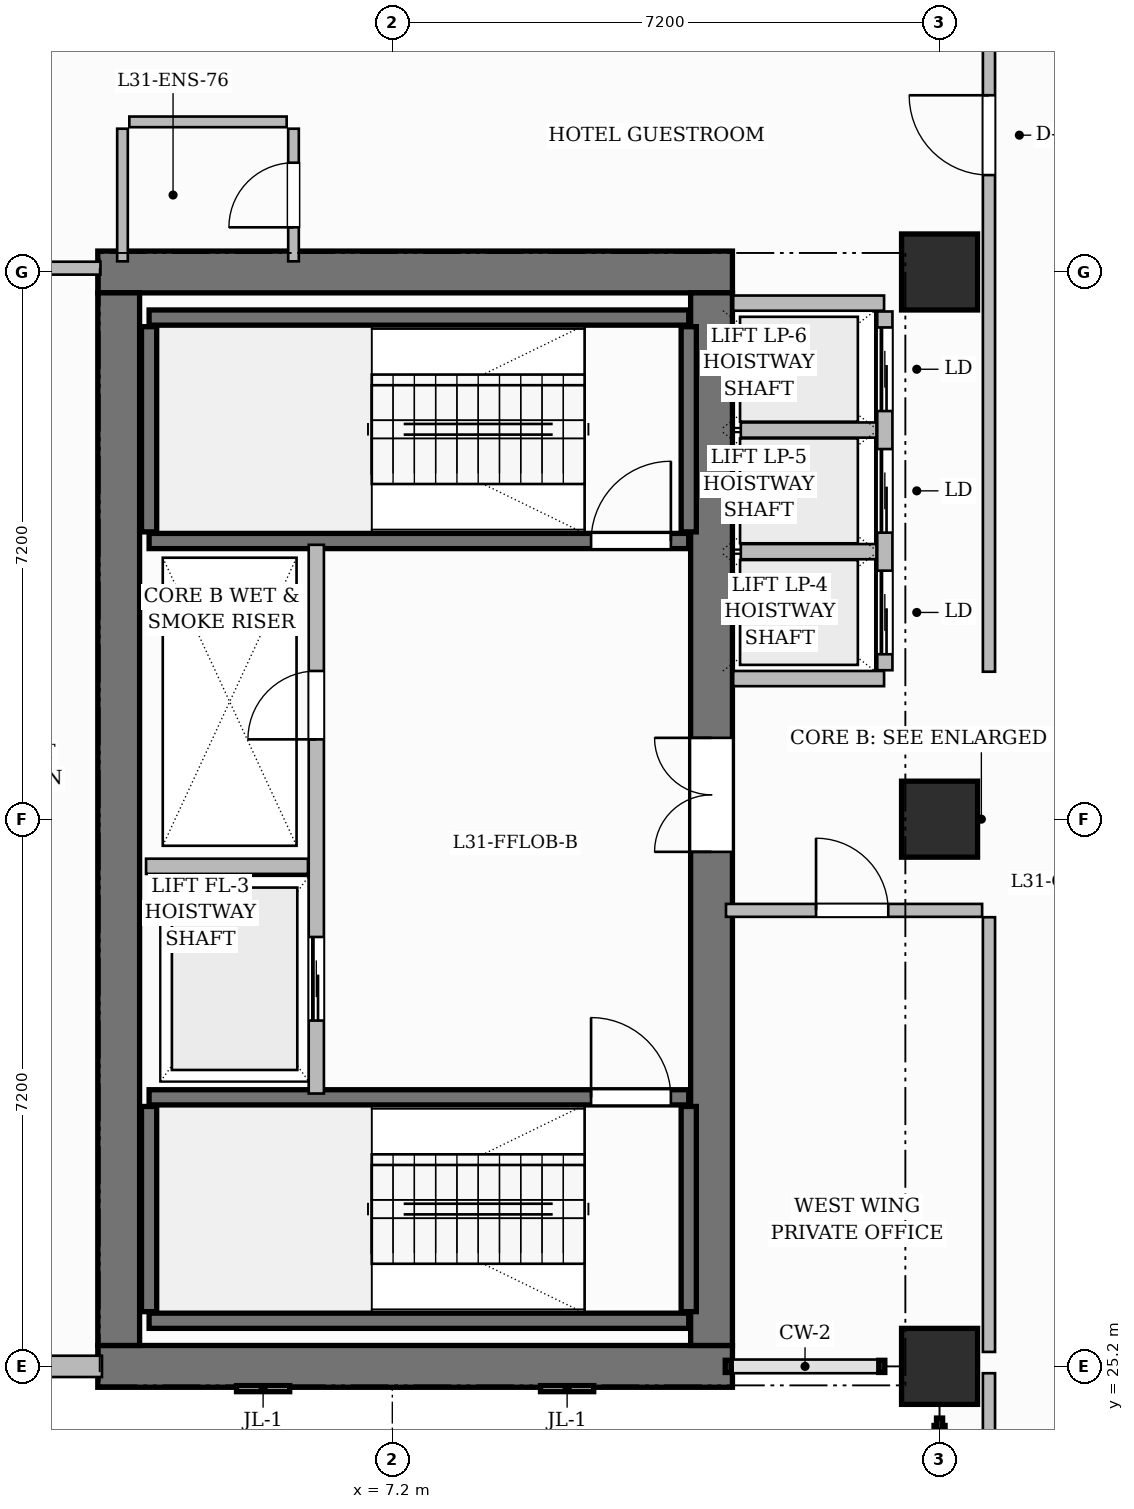
"""IFC4 building model, lengths in metres.
Left out: names, types, materials, properties, quantities, classifications, styles, units other than length and angle.
Written with IfcOpenShell. Run it as: python <this file> out.ifc"""

import sys

from ifc_helpers import new_model, si_unit, direction, frame, frame_2d, origin, origin_2d, place, context, subcontext, project, spatial, rectangle, extrude, source, transform, mapped, element, fill, save


model = new_model("IFC4")
c1 = context("Model", 3, precision=1e-05, world=origin(), true_north=direction((0.0, 1.0)))
c2 = subcontext(c1, "Body", "Model", "MODEL_VIEW")
j1 = project(units=[si_unit("LENGTHUNIT", "METRE"), si_unit("PLANEANGLEUNIT", "RADIAN")], contexts=[c1])
p1 = place(None, origin())
s1 = spatial("IfcSite", under=j1, at=p1, CompositionType="ELEMENT")
p2 = place(p1, origin())
s2 = spatial("IfcBuilding", under=s1, at=p2, CompositionType="ELEMENT")
p3 = place(p2, frame((0.0, 0.0, 126.6)))
s3 = spatial("IfcBuildingStorey", under=s2, at=p3, CompositionType="ELEMENT", Elevation=126.6)
for number, where, z_axis, x_axis in (
    (1, (3.325, 25.2, 0.0), (0.0, 0.0, 1.0), (1.0, 0.0, 0.0)),
    (2, (3.325, 39.6, 0.0), (0.0, 0.0, 1.0), (1.0, 0.0, 0.0)),
):
    element("IfcWall", number, at=place(p3, frame(where, z_axis=z_axis, x_axis=x_axis)), inside=s3, PredefinedType="SHEAR", context=c2, shape_type="SweptSolid", body=[
        extrude(rectangle(XDim=8.35, YDim=0.55, at=frame_2d((4.175, 0.0))), origin(), (0.0, 0.0, 1.0), 3.7),
    ])
p4 = place(p3, frame((3.6, 25.475, 0.0), z_axis=(0.0, 0.0, 1.0), x_axis=(0.0, 1.0, 0.0)))
e3 = element("IfcWall", 3, at=p4, inside=s3, PredefinedType="SHEAR", context=c2, shape_type="SweptSolid", body=[
    extrude(rectangle(XDim=13.85, YDim=0.55, at=frame_2d((6.925, 0.0))), origin(), (0.0, 0.0, 1.0), 3.7),
])
p5 = place(p3, frame((11.4, 25.475, 0.0), z_axis=(0.0, 0.0, 1.0), x_axis=(0.0, 1.0, 0.0)))
e4 = element("IfcWall", 4, at=p5, inside=s3, PredefinedType="SHEAR", context=c2, shape_type="SweptSolid", body=[
    extrude(rectangle(XDim=13.85, YDim=0.55, at=frame_2d((6.925, 0.0))), origin(), (0.0, 0.0, 1.0), 3.7),
])
p6 = place(p5, frame((6.495, 0.0, 0.0)))
e5 = element("IfcOpeningElement", 5, at=p6, cuts=e4, PredefinedType="OPENING", context=c2, shape_type="SweptSolid", body=[
    extrude(rectangle(XDim=1.5, YDim=2.2, at=frame_2d((0.75, 1.1))), frame((0.0, 0.285, 0.0), z_axis=(0.0, -1.0, 0.0), x_axis=(1.0, 0.0, 0.0)), (0.0, 0.0, 1.0), 0.57),
])
m1 = source(origin(), c2, "Body", "SweptSolid", [
    extrude(rectangle(XDim=1.0, YDim=1.0, at=origin_2d()), origin(), (0.0, 0.0, 1.0), 3.7),
])
for number, where, z_axis, x_axis in (
    (6, (14.4, 25.2, 0.0), (0.0, 0.0, 1.0), (1.0, 0.0, 0.0)),
    (7, (14.4, 32.4, 0.0), (0.0, 0.0, 1.0), (1.0, 0.0, 0.0)),
    (8, (14.4, 39.6, 0.0), (0.0, 0.0, 1.0), (1.0, 0.0, 0.0)),
):
    element("IfcColumn", number, at=place(p3, frame(where, z_axis=z_axis, x_axis=x_axis)), inside=s3, PredefinedType="COLUMN", context=c2, shape_type="MappedRepresentation", body=[
        mapped(m1, transform((0.0, 0.0, 0.0), scale=1.0)),
    ])
p7 = place(p3, frame((4.0, 25.8, 0.0), z_axis=(0.0, 0.0, 1.0), x_axis=(1.0, 0.0, 0.0)))
e9 = element("IfcWall", 9, at=p7, inside=s3, PredefinedType="SHEAR", context=c2, shape_type="SweptSolid", body=[
    extrude(rectangle(XDim=7.1, YDim=0.2, at=frame_2d((3.55, 0.0))), origin(), (0.0, 0.0, 1.0), 3.7),
])
for number, where, z_axis, x_axis in (
    (10, (4.0, 25.92, 0.0), (0.0, 0.0, 1.0), (0.0, 1.0, 0.0)),
    (11, (11.1, 25.92, 0.0), (0.0, 0.0, 1.0), (0.0, 1.0, 0.0)),
):
    element("IfcWall", number, at=place(p3, frame(where, z_axis=z_axis, x_axis=x_axis)), inside=s3, PredefinedType="SHEAR", context=c2, shape_type="SweptSolid", body=[
        extrude(rectangle(XDim=2.7, YDim=0.2, at=frame_2d((1.35, 0.0))), origin(), (0.0, 0.0, 1.0), 3.7),
    ])
p8 = place(p3, frame((4.0, 28.74, 0.0), z_axis=(0.0, 0.0, 1.0), x_axis=(1.0, 0.0, 0.0)))
e12 = element("IfcWall", 12, at=p8, inside=s3, PredefinedType="SHEAR", context=c2, shape_type="SweptSolid", body=[
    extrude(rectangle(XDim=7.1, YDim=0.2, at=frame_2d((3.55, 0.0))), origin(), (0.0, 0.0, 1.0), 3.7),
])
p9 = place(p8, frame((5.815, 0.0, 0.0)))
e13 = element("IfcOpeningElement", 13, at=p9, cuts=e12, PredefinedType="OPENING", context=c2, shape_type="SweptSolid", body=[
    extrude(rectangle(XDim=1.05, YDim=2.2, at=frame_2d((0.525, 1.1))), frame((0.0, 0.11, 0.0), z_axis=(0.0, -1.0, 0.0), x_axis=(1.0, 0.0, 0.0)), (0.0, 0.0, 1.0), 0.22),
])
p10 = place(p3, frame((4.0, 39.0, 0.0), z_axis=(0.0, 0.0, 1.0), x_axis=(1.0, 0.0, 0.0)))
e14 = element("IfcWall", 14, at=p10, inside=s3, PredefinedType="SHEAR", context=c2, shape_type="SweptSolid", body=[
    extrude(rectangle(XDim=7.1, YDim=0.2, at=frame_2d((3.55, 0.0))), origin(), (0.0, 0.0, 1.0), 3.7),
])
for number, where, z_axis, x_axis in (
    (15, (4.0, 36.18, 0.0), (0.0, 0.0, 1.0), (0.0, 1.0, 0.0)),
    (16, (11.1, 36.18, 0.0), (0.0, 0.0, 1.0), (0.0, 1.0, 0.0)),
):
    element("IfcWall", number, at=place(p3, frame(where, z_axis=z_axis, x_axis=x_axis)), inside=s3, PredefinedType="SHEAR", context=c2, shape_type="SweptSolid", body=[
        extrude(rectangle(XDim=2.7, YDim=0.2, at=frame_2d((1.35, 0.0))), origin(), (0.0, 0.0, 1.0), 3.7),
    ])
p11 = place(p3, frame((4.0, 36.06, 0.0), z_axis=(0.0, 0.0, 1.0), x_axis=(1.0, 0.0, 0.0)))
e17 = element("IfcWall", 17, at=p11, inside=s3, PredefinedType="SHEAR", context=c2, shape_type="SweptSolid", body=[
    extrude(rectangle(XDim=7.1, YDim=0.2, at=frame_2d((3.55, 0.0))), origin(), (0.0, 0.0, 1.0), 3.7),
])
p12 = place(p11, frame((5.815, 0.0, 0.0)))
e18 = element("IfcOpeningElement", 18, at=p12, cuts=e17, PredefinedType="OPENING", context=c2, shape_type="SweptSolid", body=[
    extrude(rectangle(XDim=1.05, YDim=2.2, at=frame_2d((0.525, 1.1))), frame((0.0, 0.11, 0.0), z_axis=(0.0, -1.0, 0.0), x_axis=(1.0, 0.0, 0.0)), (0.0, 0.0, 1.0), 0.22),
])
p13 = place(p3, frame((6.2, 28.79, 0.0), z_axis=(0.0, 0.0, 1.0), x_axis=(0.0, 1.0, 0.0)))
e19 = element("IfcWall", 19, at=p13, inside=s3, PredefinedType="PARTITIONING", context=c2, shape_type="SweptSolid", body=[
    extrude(rectangle(XDim=7.22, YDim=0.2, at=frame_2d((3.61, 0.0))), origin(), (0.0, 0.0, 1.0), 3.45),
])
p14 = place(p13, frame((4.66, 0.0, 0.0)))
e20 = element("IfcOpeningElement", 20, at=p14, cuts=e19, PredefinedType="OPENING", context=c2, shape_type="SweptSolid", body=[
    extrude(rectangle(XDim=0.9, YDim=2.1, at=frame_2d((0.45, 1.05))), frame((0.0, 0.11, 0.0), z_axis=(0.0, -1.0, 0.0), x_axis=(1.0, 0.0, 0.0)), (0.0, 0.0, 1.0), 0.22),
])
p15 = place(p13, frame((0.96, 0.0, 0.0)))
e21 = element("IfcOpeningElement", 21, at=p15, cuts=e19, PredefinedType="OPENING", context=c2, shape_type="SweptSolid", body=[
    extrude(rectangle(XDim=1.1, YDim=2.2, at=frame_2d((0.55, 1.1))), frame((0.0, 0.11, 0.0), z_axis=(0.0, -1.0, 0.0), x_axis=(1.0, 0.0, 0.0)), (0.0, 0.0, 1.0), 0.22),
])
p16 = place(p3, frame((3.96, 31.78, 0.0), z_axis=(0.0, 0.0, 1.0), x_axis=(1.0, 0.0, 0.0)))
e22 = element("IfcWall", 22, at=p16, inside=s3, PredefinedType="PARTITIONING", context=c2, shape_type="SweptSolid", body=[
    extrude(rectangle(XDim=2.13, YDim=0.2, at=frame_2d((1.065, 0.0))), origin(), (0.0, 0.0, 1.0), 3.45),
])
for number, where, z_axis, x_axis in (
    (23, (11.685, 34.25, 0.0), (0.0, 0.0, 1.0), (1.0, 0.0, 0.0)),
    (24, (11.685, 39.19, 0.0), (0.0, 0.0, 1.0), (1.0, 0.0, 0.0)),
):
    element("IfcWall", number, at=place(p3, frame(where, z_axis=z_axis, x_axis=x_axis)), inside=s3, PredefinedType="PARTITIONING", context=c2, shape_type="SweptSolid", body=[
        extrude(rectangle(XDim=1.985, YDim=0.2, at=frame_2d((0.992, 0.0))), origin(), (0.0, 0.0, 1.0), 3.45),
    ])
p17 = place(p3, frame((13.68, 34.36, 0.0), z_axis=(0.0, 0.0, 1.0), x_axis=(0.0, 1.0, 0.0)))
e25 = element("IfcWall", 25, at=p17, inside=s3, PredefinedType="PARTITIONING", context=c2, shape_type="SweptSolid", body=[
    extrude(rectangle(XDim=4.72, YDim=0.2, at=frame_2d((2.36, 0.0))), origin(), (0.0, 0.0, 1.0), 3.45),
])
p18 = place(p17, frame((0.21, 0.0, 0.0)))
e26 = element("IfcOpeningElement", 26, at=p18, cuts=e25, PredefinedType="OPENING", context=c2, shape_type="SweptSolid", body=[
    extrude(rectangle(XDim=1.1, YDim=2.2, at=frame_2d((0.55, 1.1))), frame((0.0, 0.11, 0.0), z_axis=(0.0, -1.0, 0.0), x_axis=(1.0, 0.0, 0.0)), (0.0, 0.0, 1.0), 0.22),
])
p19 = place(p17, frame((1.81, 0.0, 0.0)))
e27 = element("IfcOpeningElement", 27, at=p19, cuts=e25, PredefinedType="OPENING", context=c2, shape_type="SweptSolid", body=[
    extrude(rectangle(XDim=1.1, YDim=2.2, at=frame_2d((0.55, 1.1))), frame((0.0, 0.11, 0.0), z_axis=(0.0, -1.0, 0.0), x_axis=(1.0, 0.0, 0.0)), (0.0, 0.0, 1.0), 0.22),
])
p20 = place(p17, frame((3.41, 0.0, 0.0)))
e28 = element("IfcOpeningElement", 28, at=p20, cuts=e25, PredefinedType="OPENING", context=c2, shape_type="SweptSolid", body=[
    extrude(rectangle(XDim=1.1, YDim=2.2, at=frame_2d((0.55, 1.1))), frame((0.0, 0.11, 0.0), z_axis=(0.0, -1.0, 0.0), x_axis=(1.0, 0.0, 0.0)), (0.0, 0.0, 1.0), 0.22),
])
for number, where, z_axis, x_axis in (
    (29, (11.785, 35.92, 0.0), (0.0, 0.0, 1.0), (1.0, 0.0, 0.0)),
    (30, (11.785, 37.52, 0.0), (0.0, 0.0, 1.0), (1.0, 0.0, 0.0)),
):
    element("IfcWall", number, at=place(p3, frame(where, z_axis=z_axis, x_axis=x_axis)), inside=s3, PredefinedType="PARTITIONING", context=c2, shape_type="SweptSolid", body=[
        extrude(rectangle(XDim=1.785, YDim=0.2, at=frame_2d((0.893, 0.0))), origin(), (0.0, 0.0, 1.0), 3.45),
    ])
p21 = place(p3, frame((15.05, 12.36, 0.0), z_axis=(0.0, 0.0, 1.0), x_axis=(0.0, 1.0, 0.0)))
e31 = element("IfcWall", 31, at=p21, inside=s3, PredefinedType="PARTITIONING", context=c2, shape_type="SweptSolid", body=[
    extrude(rectangle(XDim=12.75, YDim=0.16, at=frame_2d((6.375, 0.0))), origin(), (0.0, 0.0, 1.0), 3.45),
])
p22 = place(p3, frame((0.24, 39.65, 0.0), z_axis=(0.0, 0.0, 1.0), x_axis=(1.0, 0.0, 0.0)))
e32 = element("IfcWall", 32, at=p22, inside=s3, PredefinedType="PARTITIONING", context=c2, shape_type="SweptSolid", body=[
    extrude(rectangle(XDim=3.12, YDim=0.17, at=frame_2d((1.56, 0.0))), origin(), (0.0, 0.0, 1.0), 3.45),
])
p23 = place(p22, frame((1.11, 0.0, 0.0)))
e33 = element("IfcOpeningElement", 33, at=p23, cuts=e32, PredefinedType="OPENING", context=c2, shape_type="SweptSolid", body=[
    extrude(rectangle(XDim=0.9, YDim=2.15, at=frame_2d((0.45, 1.075))), frame((0.0, 0.095, 0.0), z_axis=(0.0, -1.0, 0.0), x_axis=(1.0, 0.0, 0.0)), (0.0, 0.0, 1.0), 0.19),
])
p24 = place(p3, frame((15.05, 34.34, 0.0), z_axis=(0.0, 0.0, 1.0), x_axis=(0.0, 1.0, 0.0)))
e34 = element("IfcWall", 34, at=p24, inside=s3, PredefinedType="PARTITIONING", context=c2, shape_type="SweptSolid", body=[
    extrude(rectangle(XDim=12.312, YDim=0.16, at=frame_2d((6.156, 0.0))), origin(), (0.0, 0.0, 1.0), 3.45),
])
p25 = place(p24, frame((6.535, 0.0, 0.0)))
e35 = element("IfcOpeningElement", 35, at=p25, cuts=e34, PredefinedType="OPENING", context=c2, shape_type="SweptSolid", body=[
    extrude(rectangle(XDim=1.05, YDim=2.25, at=frame_2d((0.525, 1.125))), frame((0.0, 0.09, 0.0), z_axis=(0.0, -1.0, 0.0), x_axis=(1.0, 0.0, 0.0)), (0.0, 0.0, 1.0), 0.18),
])
p26 = place(p24, frame((10.06, 0.0, 0.0)))
e36 = element("IfcOpeningElement", 36, at=p26, cuts=e34, PredefinedType="OPENING", context=c2, shape_type="SweptSolid", body=[
    extrude(rectangle(XDim=1.0, YDim=2.2, at=frame_2d((0.5, 1.1))), frame((0.0, 0.09, 0.0), z_axis=(0.0, -1.0, 0.0), x_axis=(1.0, 0.0, 0.0)), (0.0, 0.0, 1.0), 0.18),
])
p27 = place(p3, frame((3.65, 39.74, 0.0), z_axis=(0.0, 0.0, 1.0), x_axis=(0.0, 1.0, 0.0)))
e37 = element("IfcWall", 37, at=p27, inside=s3, PredefinedType="PARTITIONING", context=c2, shape_type="SweptSolid", body=[
    extrude(rectangle(XDim=1.745, YDim=0.14, at=frame_2d((0.873, 0.0))), origin(), (0.0, 0.0, 1.0), 3.45),
])
p28 = place(p3, frame((3.74, 41.575, 0.0), z_axis=(0.0, 0.0, 1.0), x_axis=(1.0, 0.0, 0.0)))
e38 = element("IfcWall", 38, at=p28, inside=s3, PredefinedType="PARTITIONING", context=c2, shape_type="SweptSolid", body=[
    extrude(rectangle(XDim=2.07, YDim=0.14, at=frame_2d((1.035, 0.0))), origin(), (0.0, 0.0, 1.0), 2.935),
])
p29 = place(p3, frame((5.9, 39.74, 0.0), z_axis=(0.0, 0.0, 1.0), x_axis=(0.0, 1.0, 0.0)))
e39 = element("IfcWall", 39, at=p29, inside=s3, PredefinedType="PARTITIONING", context=c2, shape_type="SweptSolid", body=[
    extrude(rectangle(XDim=1.745, YDim=0.14, at=frame_2d((0.873, 0.0))), origin(), (0.0, 0.0, 1.0), 3.45),
])
p30 = place(p29, frame((0.448, 0.0, 0.0)))
e40 = element("IfcOpeningElement", 40, at=p30, cuts=e39, PredefinedType="OPENING", context=c2, shape_type="SweptSolid", body=[
    extrude(rectangle(XDim=0.85, YDim=2.1, at=frame_2d((0.425, 1.05))), frame((0.0, 0.08, 0.0), z_axis=(0.0, -1.0, 0.0), x_axis=(1.0, 0.0, 0.0)), (0.0, 0.0, 1.0), 0.16),
])
p31 = place(p3, frame((15.05, 25.39, 0.0), z_axis=(0.0, 0.0, 1.0), x_axis=(0.0, 1.0, 0.0)))
e41 = element("IfcWall", 41, at=p31, inside=s3, PredefinedType="PARTITIONING", context=c2, shape_type="SweptSolid", body=[
    extrude(rectangle(XDim=5.72, YDim=0.16, at=frame_2d((2.86, 0.0))), origin(), (0.0, 0.0, 1.0), 3.45),
])
p32 = place(p3, frame((11.59, 31.2, 0.0), z_axis=(0.0, 0.0, 1.0), x_axis=(1.0, 0.0, 0.0)))
e42 = element("IfcWall", 42, at=p32, inside=s3, PredefinedType="PARTITIONING", context=c2, shape_type="SweptSolid", body=[
    extrude(rectangle(XDim=3.37, YDim=0.17, at=frame_2d((1.685, 0.0))), origin(), (0.0, 0.0, 1.0), 3.45),
])
p33 = place(p32, frame((1.185, 0.0, 0.0)))
e43 = element("IfcOpeningElement", 43, at=p33, cuts=e42, PredefinedType="OPENING", context=c2, shape_type="SweptSolid", body=[
    extrude(rectangle(XDim=0.95, YDim=2.15, at=frame_2d((0.475, 1.075))), frame((0.0, 0.095, 0.0), z_axis=(0.0, -1.0, 0.0), x_axis=(1.0, 0.0, 0.0)), (0.0, 0.0, 1.0), 0.19),
])
p34 = place(p3, frame((0.0, 25.2, 0.0), z_axis=(0.0, 0.0, 1.0), x_axis=(1.0, 0.0, 0.0)))
e44 = element("IfcWall", 44, at=p34, inside=s3, PredefinedType="SOLIDWALL", context=c2, shape_type="SweptSolid", body=[
    extrude(rectangle(XDim=3.38, YDim=0.28, at=frame_2d((1.69, 0.0))), origin(), (0.0, 0.0, 1.0), 3.45),
])
p35 = place(p34, frame((1.205, 0.0, 0.8)))
e45 = element("IfcOpeningElement", 45, at=p35, cuts=e44, PredefinedType="OPENING", context=c2, shape_type="SweptSolid", body=[
    extrude(rectangle(XDim=1.4, YDim=1.85, at=frame_2d((0.7, 0.925))), frame((0.0, 0.15, 0.0), z_axis=(0.0, -1.0, 0.0), x_axis=(1.0, 0.0, 0.0)), (0.0, 0.0, 1.0), 0.3),
])
m2 = source(origin(), c2, "Body", "SweptSolid", [
    extrude(rectangle(XDim=1.05, YDim=2.2, at=frame_2d((0.525, 1.1))), frame((0.0, 0.025, 0.0), z_axis=(0.0, -1.0, 0.0), x_axis=(1.0, 0.0, 0.0)), (0.0, 0.0, 1.0), 0.05),
])
p36 = place(p9, origin())
e46 = element("IfcDoor", 46, at=p36, inside=s3, OperationType="SINGLE_SWING_LEFT", PredefinedType="DOOR", context=c2, shape_type="MappedRepresentation", body=[
    mapped(m2, transform((0.0, 0.0, 0.0), scale=1.0)),
])
fill(e13, e46)
p37 = place(p12, origin())
e47 = element("IfcDoor", 47, at=p37, inside=s3, OperationType="SINGLE_SWING_RIGHT", PredefinedType="DOOR", context=c2, shape_type="MappedRepresentation", body=[
    mapped(m2, transform((0.0, 0.0, 0.0), scale=1.0)),
])
fill(e18, e47)
m3 = source(origin(), c2, "Body", "SweptSolid", [
    extrude(rectangle(XDim=0.9, YDim=2.1, at=frame_2d((0.45, 1.05))), frame((0.0, 0.025, 0.0), z_axis=(0.0, -1.0, 0.0), x_axis=(1.0, 0.0, 0.0)), (0.0, 0.0, 1.0), 0.05),
])
p38 = place(p14, origin())
e48 = element("IfcDoor", 48, at=p38, inside=s3, OperationType="SINGLE_SWING_LEFT", PredefinedType="DOOR", context=c2, shape_type="MappedRepresentation", body=[
    mapped(m3, transform((0.0, 0.0, 0.0), scale=1.0)),
])
fill(e20, e48)
m4 = source(origin(), c2, "Body", "SweptSolid", [
    extrude(rectangle(XDim=1.5, YDim=2.2, at=frame_2d((0.75, 1.1))), frame((0.0, 0.025, 0.0), z_axis=(0.0, -1.0, 0.0), x_axis=(1.0, 0.0, 0.0)), (0.0, 0.0, 1.0), 0.05),
])
p39 = place(p6, origin())
e49 = element("IfcDoor", 49, at=p39, inside=s3, OperationType="DOUBLE_DOOR_SINGLE_SWING", PredefinedType="DOOR", context=c2, shape_type="MappedRepresentation", body=[
    mapped(m4, transform((0.0, 0.0, 0.0), scale=1.0)),
])
fill(e5, e49)
m5 = source(origin(), c2, "Body", "SweptSolid", [
    extrude(rectangle(XDim=0.85, YDim=2.1, at=frame_2d((0.425, 1.05))), frame((0.0, 0.025, 0.0), z_axis=(0.0, -1.0, 0.0), x_axis=(1.0, 0.0, 0.0)), (0.0, 0.0, 1.0), 0.05),
])
p40 = place(p30, origin())
e50 = element("IfcDoor", 50, at=p40, inside=s3, OperationType="SINGLE_SWING_LEFT", PredefinedType="DOOR", context=c2, shape_type="MappedRepresentation", body=[
    mapped(m5, transform((0.0, 0.0, 0.0), scale=1.0)),
])
fill(e40, e50)
m6 = source(origin(), c2, "Body", "SweptSolid", [
    extrude(rectangle(XDim=1.05, YDim=2.25, at=frame_2d((0.525, 1.125))), frame((0.0, 0.025, 0.0), z_axis=(0.0, -1.0, 0.0), x_axis=(1.0, 0.0, 0.0)), (0.0, 0.0, 1.0), 0.05),
])
p41 = place(p25, origin())
e51 = element("IfcDoor", 51, at=p41, inside=s3, OperationType="SINGLE_SWING_RIGHT", PredefinedType="DOOR", context=c2, shape_type="MappedRepresentation", body=[
    mapped(m6, transform((0.0, 0.0, 0.0), scale=1.0)),
])
fill(e35, e51)
m7 = source(origin(), c2, "Body", "SweptSolid", [
    extrude(rectangle(XDim=0.95, YDim=2.15, at=frame_2d((0.475, 1.075))), frame((0.0, 0.025, 0.0), z_axis=(0.0, -1.0, 0.0), x_axis=(1.0, 0.0, 0.0)), (0.0, 0.0, 1.0), 0.05),
])
p42 = place(p33, origin())
e52 = element("IfcDoor", 52, at=p42, inside=s3, OperationType="SINGLE_SWING_LEFT", PredefinedType="DOOR", context=c2, shape_type="MappedRepresentation", body=[
    mapped(m7, transform((0.0, 0.0, 0.0), scale=1.0)),
])
fill(e43, e52)
m8 = source(origin(), c2, "Body", "SweptSolid", [
    extrude(rectangle(XDim=1.1, YDim=2.2, at=frame_2d((0.55, 1.1))), frame((0.0, 0.025, 0.0), z_axis=(0.0, -1.0, 0.0), x_axis=(1.0, 0.0, 0.0)), (0.0, 0.0, 1.0), 0.05),
])
p43 = place(p15, origin())
e53 = element("IfcDoor", 53, at=p43, inside=s3, OperationType="SLIDING_TO_LEFT", PredefinedType="DOOR", context=c2, shape_type="MappedRepresentation", body=[
    mapped(m8, transform((0.0, 0.0, 0.0), scale=1.0)),
])
fill(e21, e53)
p44 = place(p18, origin())
e54 = element("IfcDoor", 54, at=p44, inside=s3, OperationType="SLIDING_TO_LEFT", PredefinedType="DOOR", context=c2, shape_type="MappedRepresentation", body=[
    mapped(m8, transform((0.0, 0.0, 0.0), scale=1.0)),
])
fill(e26, e54)
p45 = place(p19, origin())
e55 = element("IfcDoor", 55, at=p45, inside=s3, OperationType="SLIDING_TO_LEFT", PredefinedType="DOOR", context=c2, shape_type="MappedRepresentation", body=[
    mapped(m8, transform((0.0, 0.0, 0.0), scale=1.0)),
])
fill(e27, e55)
p46 = place(p20, origin())
e56 = element("IfcDoor", 56, at=p46, inside=s3, OperationType="SLIDING_TO_LEFT", PredefinedType="DOOR", context=c2, shape_type="MappedRepresentation", body=[
    mapped(m8, transform((0.0, 0.0, 0.0), scale=1.0)),
])
fill(e28, e56)
save(model, sys.argv[1])
